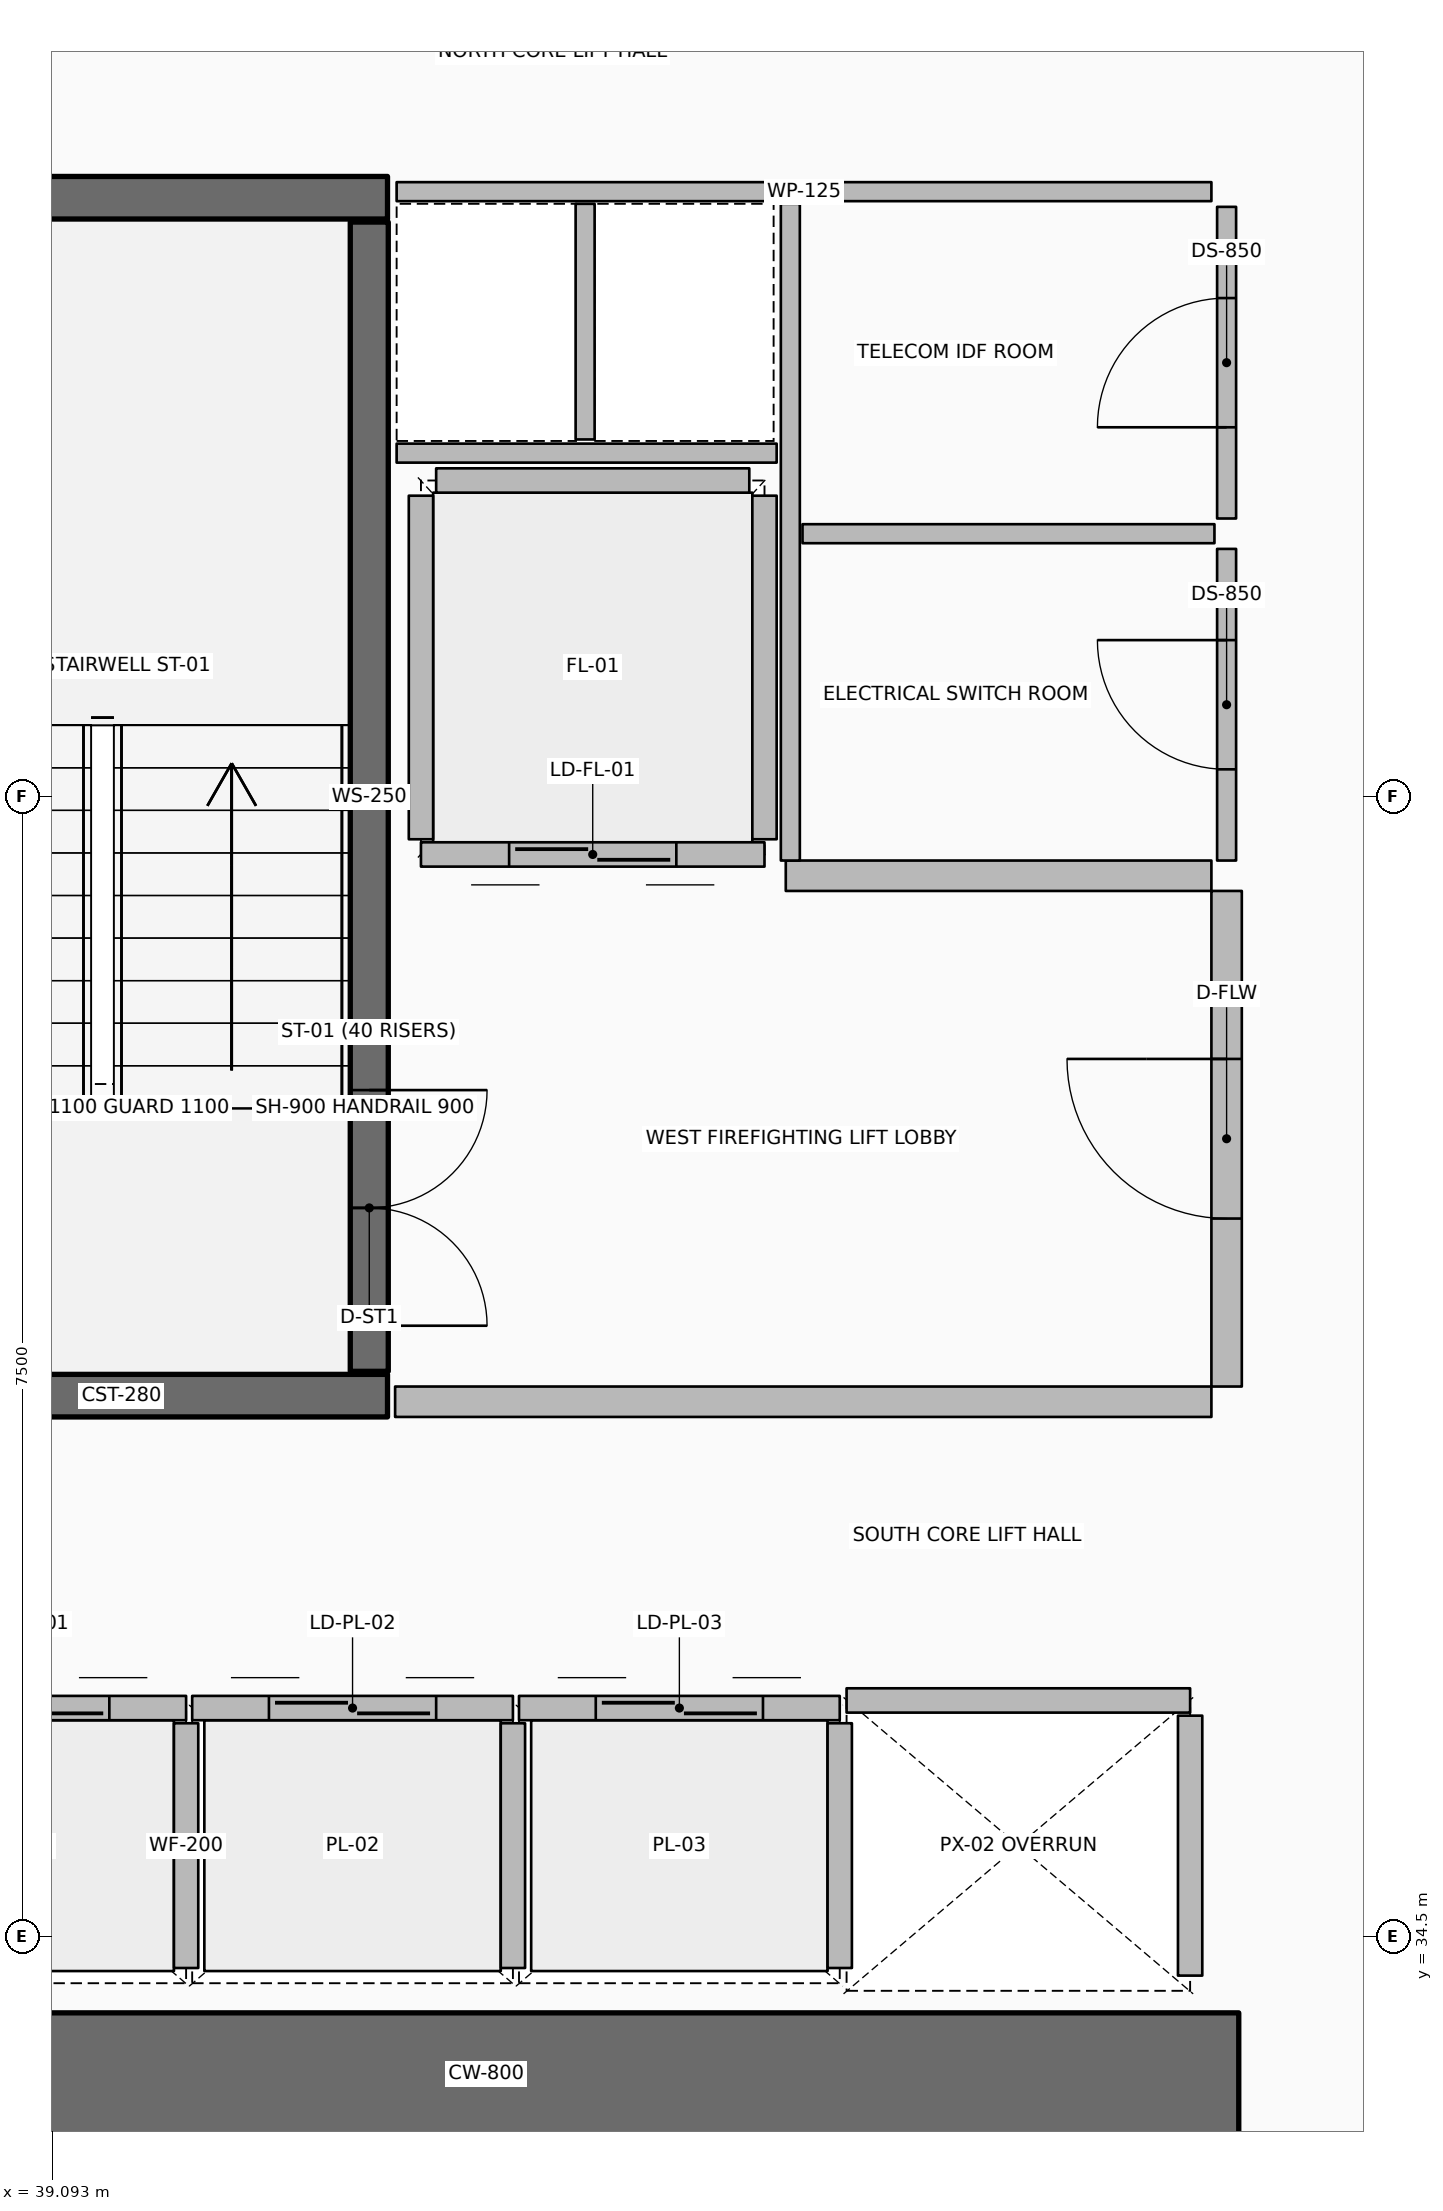
"""IFC4 building model, lengths in metres.
Left out: names, types, materials, properties, quantities, classifications, styles, units other than length and angle.
Written with IfcOpenShell. Run it as: python <this file> out.ifc"""

import sys

from ifc_helpers import new_model, si_unit, direction, frame, frame_2d, origin, origin_2d, place, context, subcontext, project, spatial, rectangle, hollow_rectangle, extrude, element, fill, save


model = new_model("IFC4")
c1 = context("Model", 3, precision=1e-05, world=origin(), true_north=direction((0.0, 1.0)))
c2 = subcontext(c1, "Body", "Model", "MODEL_VIEW")
j1 = project(units=[si_unit("LENGTHUNIT", "METRE"), si_unit("PLANEANGLEUNIT", "RADIAN")], contexts=[c1])
p1 = place(None, origin())
s1 = spatial("IfcSite", under=j1, at=p1, CompositionType="ELEMENT")
p2 = place(p1, origin())
s2 = spatial("IfcBuilding", under=s1, at=p2, CompositionType="ELEMENT")
p3 = place(p2, frame((0.0, 0.0, 116.4)))
s3 = spatial("IfcBuildingStorey", under=s2, at=p3, CompositionType="ELEMENT", Elevation=116.4)
p4 = place(p3, frame((37.0, 33.6, 0.0), z_axis=(0.0, 0.0, 1.0), x_axis=(1.0, 0.0, 0.0)))
e1 = element("IfcWall", 1, at=p4, inside=s3, PredefinedType="SHEAR", context=c2, shape_type="SweptSolid", body=[
    extrude(rectangle(XDim=9.9, YDim=0.8, at=frame_2d((4.95, 0.0))), origin(), (0.0, 0.0, 1.0), 6.6),
])
for number, where, z_axis, x_axis in (
    (2, (37.8, 38.06, 0.0), (0.0, 0.0, 1.0), (1.0, 0.0, 0.0)),
    (3, (37.8, 45.94, 0.0), (0.0, 0.0, 1.0), (1.0, 0.0, 0.0)),
):
    element("IfcWall", number, at=place(p3, frame(where, z_axis=z_axis, x_axis=x_axis)), inside=s3, PredefinedType="SHEAR", context=c2, shape_type="SweptSolid", body=[
        extrude(rectangle(XDim=3.5, YDim=0.28, at=frame_2d((1.75, 0.0))), origin(), (0.0, 0.0, 1.0), 6.6),
    ])
p5 = place(p3, frame((41.18, 42.47, 0.0), z_axis=(0.0, 0.0, 1.0), x_axis=(1.0, 0.0, 0.0)))
e4 = element("IfcColumn", 4, at=p5, inside=s3, PredefinedType="COLUMN", context=c2, shape_type="SweptSolid", body=[
    extrude(hollow_rectangle(XDim=0.2, YDim=0.2, WallThickness=0.01, InnerFilletRadius=0.01, OuterFilletRadius=0.02, at=origin_2d()), origin(), (0.0, 0.0, 1.0), 1.445),
])
p6 = place(p3, frame((41.18, 43.17, 0.0), z_axis=(0.0, 0.0, 1.0), x_axis=(1.0, 0.0, 0.0)))
e5 = element("IfcColumn", 5, at=p6, inside=s3, PredefinedType="COLUMN", context=c2, shape_type="SweptSolid", body=[
    extrude(hollow_rectangle(XDim=0.2, YDim=0.2, WallThickness=0.01, InnerFilletRadius=0.01, OuterFilletRadius=0.02, at=origin_2d()), origin(), (0.0, 0.0, 1.0), 4.745),
])
p7 = place(p3, frame((41.18, 38.22, 0.0), z_axis=(0.0, 0.0, 1.0), x_axis=(0.0, 1.0, 0.0)))
e6 = element("IfcWall", 6, at=p7, inside=s3, PredefinedType="SOLIDWALL", context=c2, shape_type="SweptSolid", body=[
    extrude(rectangle(XDim=7.56, YDim=0.25, at=frame_2d((3.78, 0.0))), origin(), (0.0, 0.0, 1.0), 6.28),
])
p8 = place(p7, frame((0.3, 0.0, 0.0)))
e7 = element("IfcOpeningElement", 7, at=p8, cuts=e6, PredefinedType="OPENING", context=c2, shape_type="SweptSolid", body=[
    extrude(rectangle(XDim=1.55, YDim=2.15, at=frame_2d((0.775, 1.075))), frame((0.0, 0.135, 0.0), z_axis=(0.0, -1.0, 0.0), x_axis=(1.0, 0.0, 0.0)), (0.0, 0.0, 1.0), 0.27),
])
p9 = place(p3, frame((37.865, 36.005, 0.0), z_axis=(0.0, 0.0, 1.0), x_axis=(1.0, 0.0, 0.0)))
e8 = element("IfcWall", 8, at=p9, inside=s3, PredefinedType="PARTITIONING", context=c2, shape_type="SweptSolid", body=[
    extrude(rectangle(XDim=2.11, YDim=0.16, at=frame_2d((1.055, 0.0))), origin(), (0.0, 0.0, 1.0), 6.28),
])
p10 = place(p9, frame((0.505, 0.0, 0.0)))
e9 = element("IfcOpeningElement", 9, at=p10, cuts=e8, PredefinedType="OPENING", context=c2, shape_type="SweptSolid", body=[
    extrude(rectangle(XDim=1.1, YDim=2.1, at=frame_2d((0.55, 1.05))), frame((0.0, 0.09, 0.0), z_axis=(0.0, -1.0, 0.0), x_axis=(1.0, 0.0, 0.0)), (0.0, 0.0, 1.0), 0.18),
])
p11 = place(p3, frame((39.975, 34.295, 0.0), z_axis=(0.0, 0.0, 1.0), x_axis=(0.0, 1.0, 0.0)))
e10 = element("IfcWall", 10, at=p11, inside=s3, PredefinedType="PARTITIONING", context=c2, shape_type="SweptSolid", body=[
    extrude(rectangle(XDim=1.61, YDim=0.16, at=frame_2d((0.805, 0.0))), origin(), (0.0, 0.0, 1.0), 6.28),
])
p12 = place(p3, frame((40.015, 36.005, 0.0), z_axis=(0.0, 0.0, 1.0), x_axis=(1.0, 0.0, 0.0)))
e11 = element("IfcWall", 11, at=p12, inside=s3, PredefinedType="PARTITIONING", context=c2, shape_type="SweptSolid", body=[
    extrude(rectangle(XDim=2.11, YDim=0.16, at=frame_2d((1.055, 0.0))), origin(), (0.0, 0.0, 1.0), 6.28),
])
p13 = place(p12, frame((0.505, 0.0, 0.0)))
e12 = element("IfcOpeningElement", 12, at=p13, cuts=e11, PredefinedType="OPENING", context=c2, shape_type="SweptSolid", body=[
    extrude(rectangle(XDim=1.1, YDim=2.1, at=frame_2d((0.55, 1.05))), frame((0.0, 0.09, 0.0), z_axis=(0.0, -1.0, 0.0), x_axis=(1.0, 0.0, 0.0)), (0.0, 0.0, 1.0), 0.18),
])
p14 = place(p3, frame((42.125, 34.295, 0.0), z_axis=(0.0, 0.0, 1.0), x_axis=(0.0, 1.0, 0.0)))
e13 = element("IfcWall", 13, at=p14, inside=s3, PredefinedType="PARTITIONING", context=c2, shape_type="SweptSolid", body=[
    extrude(rectangle(XDim=1.61, YDim=0.16, at=frame_2d((0.805, 0.0))), origin(), (0.0, 0.0, 1.0), 6.28),
])
p15 = place(p3, frame((42.165, 36.005, 0.0), z_axis=(0.0, 0.0, 1.0), x_axis=(1.0, 0.0, 0.0)))
e14 = element("IfcWall", 14, at=p15, inside=s3, PredefinedType="PARTITIONING", context=c2, shape_type="SweptSolid", body=[
    extrude(rectangle(XDim=2.11, YDim=0.16, at=frame_2d((1.055, 0.0))), origin(), (0.0, 0.0, 1.0), 6.28),
])
p16 = place(p15, frame((0.505, 0.0, 0.0)))
e15 = element("IfcOpeningElement", 15, at=p16, cuts=e14, PredefinedType="OPENING", context=c2, shape_type="SweptSolid", body=[
    extrude(rectangle(XDim=1.1, YDim=2.1, at=frame_2d((0.55, 1.05))), frame((0.0, 0.09, 0.0), z_axis=(0.0, -1.0, 0.0), x_axis=(1.0, 0.0, 0.0)), (0.0, 0.0, 1.0), 0.18),
])
p17 = place(p3, frame((44.275, 34.295, 0.0), z_axis=(0.0, 0.0, 1.0), x_axis=(0.0, 1.0, 0.0)))
e16 = element("IfcWall", 16, at=p17, inside=s3, PredefinedType="PARTITIONING", context=c2, shape_type="SweptSolid", body=[
    extrude(rectangle(XDim=1.61, YDim=0.16, at=frame_2d((0.805, 0.0))), origin(), (0.0, 0.0, 1.0), 6.28),
])
p18 = place(p3, frame((44.32, 36.055, 0.0), z_axis=(0.0, 0.0, 1.0), x_axis=(1.0, 0.0, 0.0)))
e17 = element("IfcWall", 17, at=p18, inside=s3, PredefinedType="PARTITIONING", context=c2, shape_type="SweptSolid", body=[
    extrude(rectangle(XDim=2.26, YDim=0.16, at=frame_2d((1.13, 0.0))), origin(), (0.0, 0.0, 1.0), 6.28),
])
p19 = place(p3, frame((46.58, 34.245, 0.0), z_axis=(0.0, 0.0, 1.0), x_axis=(0.0, 1.0, 0.0)))
e18 = element("IfcWall", 18, at=p19, inside=s3, PredefinedType="PARTITIONING", context=c2, shape_type="SweptSolid", body=[
    extrude(rectangle(XDim=1.71, YDim=0.16, at=frame_2d((0.855, 0.0))), origin(), (0.0, 0.0, 1.0), 6.28),
])
p20 = place(p3, frame((43.78, 41.62, 0.0), z_axis=(0.0, 0.0, 1.0), x_axis=(-1.0, 0.0, 0.0)))
e19 = element("IfcWall", 19, at=p20, inside=s3, PredefinedType="PARTITIONING", context=c2, shape_type="SweptSolid", body=[
    extrude(rectangle(XDim=2.26, YDim=0.16, at=frame_2d((1.13, 0.0))), origin(), (0.0, 0.0, 1.0), 6.28),
])
p21 = place(p20, frame((0.58, 0.0, 0.0)))
e20 = element("IfcOpeningElement", 20, at=p21, cuts=e19, PredefinedType="OPENING", context=c2, shape_type="SweptSolid", body=[
    extrude(rectangle(XDim=1.1, YDim=2.1, at=frame_2d((0.55, 1.05))), frame((0.0, 0.09, 0.0), z_axis=(0.0, -1.0, 0.0), x_axis=(1.0, 0.0, 0.0)), (0.0, 0.0, 1.0), 0.18),
])
for number, where, z_axis, x_axis in (
    (21, (43.78, 41.72, 0.0), (0.0, 0.0, 1.0), (0.0, 1.0, 0.0)),
    (22, (41.52, 41.72, 0.0), (0.0, 0.0, 1.0), (0.0, 1.0, 0.0)),
):
    element("IfcWall", number, at=place(p3, frame(where, z_axis=z_axis, x_axis=x_axis)), inside=s3, PredefinedType="PARTITIONING", context=c2, shape_type="SweptSolid", body=[
        extrude(rectangle(XDim=2.26, YDim=0.16, at=frame_2d((1.13, 0.0))), origin(), (0.0, 0.0, 1.0), 6.28),
    ])
p22 = place(p3, frame((41.62, 44.08, 0.0), z_axis=(0.0, 0.0, 1.0), x_axis=(1.0, 0.0, 0.0)))
e23 = element("IfcWall", 23, at=p22, inside=s3, PredefinedType="PARTITIONING", context=c2, shape_type="SweptSolid", body=[
    extrude(rectangle(XDim=2.06, YDim=0.16, at=frame_2d((1.03, 0.0))), origin(), (0.0, 0.0, 1.0), 6.28),
])
p23 = place(p3, frame((41.35, 38.02, 0.0), z_axis=(0.0, 0.0, 1.0), x_axis=(1.0, 0.0, 0.0)))
e24 = element("IfcWall", 24, at=p23, inside=s3, PredefinedType="PARTITIONING", context=c2, shape_type="SweptSolid", body=[
    extrude(rectangle(XDim=5.37, YDim=0.2, at=frame_2d((2.685, 0.0))), origin(), (0.0, 0.0, 1.0), 6.28),
])
p24 = place(p3, frame((43.92, 41.48, 0.0), z_axis=(0.0, 0.0, 1.0), x_axis=(1.0, 0.0, 0.0)))
e25 = element("IfcWall", 25, at=p24, inside=s3, PredefinedType="PARTITIONING", context=c2, shape_type="SweptSolid", body=[
    extrude(rectangle(XDim=2.8, YDim=0.2, at=frame_2d((1.4, 0.0))), origin(), (0.0, 0.0, 1.0), 6.28),
])
p25 = place(p3, frame((46.82, 38.12, 0.0), z_axis=(0.0, 0.0, 1.0), x_axis=(0.0, 1.0, 0.0)))
e26 = element("IfcWall", 26, at=p25, inside=s3, PredefinedType="PARTITIONING", context=c2, shape_type="SweptSolid", body=[
    extrude(rectangle(XDim=3.26, YDim=0.2, at=frame_2d((1.63, 0.0))), origin(), (0.0, 0.0, 1.0), 6.28),
])
p26 = place(p25, frame((1.105, 0.0, 0.0)))
e27 = element("IfcOpeningElement", 27, at=p26, cuts=e26, PredefinedType="OPENING", context=c2, shape_type="SweptSolid", body=[
    extrude(rectangle(XDim=1.05, YDim=2.1, at=frame_2d((0.525, 1.05))), frame((0.0, 0.11, 0.0), z_axis=(0.0, -1.0, 0.0), x_axis=(1.0, 0.0, 0.0)), (0.0, 0.0, 1.0), 0.22),
])
p27 = place(p3, frame((41.36, 45.98, 0.0), z_axis=(0.0, 0.0, 1.0), x_axis=(1.0, 0.0, 0.0)))
e28 = element("IfcWall", 28, at=p27, inside=s3, PredefinedType="PARTITIONING", context=c2, shape_type="SweptSolid", body=[
    extrude(rectangle(XDim=5.36, YDim=0.125, at=frame_2d((2.68, 0.0))), origin(), (0.0, 0.0, 1.0), 5.72),
])
p28 = place(p3, frame((41.36, 44.26, 0.0), z_axis=(0.0, 0.0, 1.0), x_axis=(1.0, 0.0, 0.0)))
e29 = element("IfcWall", 29, at=p28, inside=s3, PredefinedType="PARTITIONING", context=c2, shape_type="SweptSolid", body=[
    extrude(rectangle(XDim=2.5, YDim=0.125, at=frame_2d((1.25, 0.0))), origin(), (0.0, 0.0, 1.0), 5.72),
])
p29 = place(p3, frame((42.6, 44.35, 0.0), z_axis=(0.0, 0.0, 1.0), x_axis=(0.0, 1.0, 0.0)))
e30 = element("IfcWall", 30, at=p29, inside=s3, PredefinedType="PARTITIONING", context=c2, shape_type="SweptSolid", body=[
    extrude(rectangle(XDim=1.55, YDim=0.125, at=frame_2d((0.775, 0.0))), origin(), (0.0, 0.0, 1.0), 5.72),
])
p30 = place(p3, frame((43.95, 41.58, 0.0), z_axis=(0.0, 0.0, 1.0), x_axis=(0.0, 1.0, 0.0)))
e31 = element("IfcWall", 31, at=p30, inside=s3, PredefinedType="PARTITIONING", context=c2, shape_type="SweptSolid", body=[
    extrude(rectangle(XDim=4.32, YDim=0.125, at=frame_2d((2.16, 0.0))), origin(), (0.0, 0.0, 1.0), 5.72),
])
p31 = place(p3, frame((44.03, 43.73, 0.0), z_axis=(0.0, 0.0, 1.0), x_axis=(1.0, 0.0, 0.0)))
e32 = element("IfcWall", 32, at=p31, inside=s3, PredefinedType="PARTITIONING", context=c2, shape_type="SweptSolid", body=[
    extrude(rectangle(XDim=2.71, YDim=0.125, at=frame_2d((1.355, 0.0))), origin(), (0.0, 0.0, 1.0), 5.72),
])
p32 = place(p3, frame((46.82, 41.58, 0.0), z_axis=(0.0, 0.0, 1.0), x_axis=(0.0, 1.0, 0.0)))
e33 = element("IfcWall", 33, at=p32, inside=s3, PredefinedType="PARTITIONING", context=c2, shape_type="SweptSolid", body=[
    extrude(rectangle(XDim=2.05, YDim=0.125, at=frame_2d((1.025, 0.0))), origin(), (0.0, 0.0, 1.0), 5.72),
])
p33 = place(p32, frame((0.6, 0.0, 0.0)))
e34 = element("IfcOpeningElement", 34, at=p33, cuts=e33, PredefinedType="OPENING", context=c2, shape_type="SweptSolid", body=[
    extrude(rectangle(XDim=0.85, YDim=2.06, at=frame_2d((0.425, 1.03))), frame((0.0, 0.073, 0.0), z_axis=(0.0, -1.0, 0.0), x_axis=(1.0, 0.0, 0.0)), (0.0, 0.0, 1.0), 0.145),
])
p34 = place(p3, frame((46.82, 43.83, 0.0), z_axis=(0.0, 0.0, 1.0), x_axis=(0.0, 1.0, 0.0)))
e35 = element("IfcWall", 35, at=p34, inside=s3, PredefinedType="PARTITIONING", context=c2, shape_type="SweptSolid", body=[
    extrude(rectangle(XDim=2.05, YDim=0.125, at=frame_2d((1.025, 0.0))), origin(), (0.0, 0.0, 1.0), 5.72),
])
p35 = place(p34, frame((0.6, 0.0, 0.0)))
e36 = element("IfcOpeningElement", 36, at=p35, cuts=e35, PredefinedType="OPENING", context=c2, shape_type="SweptSolid", body=[
    extrude(rectangle(XDim=0.85, YDim=2.06, at=frame_2d((0.425, 1.03))), frame((0.0, 0.073, 0.0), z_axis=(0.0, -1.0, 0.0), x_axis=(1.0, 0.0, 0.0)), (0.0, 0.0, 1.0), 0.145),
])
p36 = place(p8, origin())
e37 = element("IfcDoor", 37, at=p36, inside=s3, OperationType="DOUBLE_DOOR_SINGLE_SWING", PredefinedType="DOOR", context=c2, shape_type="SweptSolid", body=[
    extrude(rectangle(XDim=1.55, YDim=2.15, at=frame_2d((0.775, 1.075))), frame((0.0, 0.025, 0.0), z_axis=(0.0, -1.0, 0.0), x_axis=(1.0, 0.0, 0.0)), (0.0, 0.0, 1.0), 0.05),
])
fill(e7, e37)
p37 = place(p10, origin())
e38 = element("IfcDoor", 38, at=p37, inside=s3, OperationType="DOUBLE_DOOR_SLIDING", PredefinedType="DOOR", context=c2, shape_type="SweptSolid", body=[
    extrude(rectangle(XDim=1.1, YDim=2.1, at=frame_2d((0.55, 1.05))), frame((0.0, 0.025, 0.0), z_axis=(0.0, -1.0, 0.0), x_axis=(1.0, 0.0, 0.0)), (0.0, 0.0, 1.0), 0.05),
])
fill(e9, e38)
p38 = place(p13, origin())
e39 = element("IfcDoor", 39, at=p38, inside=s3, OperationType="DOUBLE_DOOR_SLIDING", PredefinedType="DOOR", context=c2, shape_type="SweptSolid", body=[
    extrude(rectangle(XDim=1.1, YDim=2.1, at=frame_2d((0.55, 1.05))), frame((0.0, 0.025, 0.0), z_axis=(0.0, -1.0, 0.0), x_axis=(1.0, 0.0, 0.0)), (0.0, 0.0, 1.0), 0.05),
])
fill(e12, e39)
p39 = place(p16, origin())
e40 = element("IfcDoor", 40, at=p39, inside=s3, OperationType="DOUBLE_DOOR_SLIDING", PredefinedType="DOOR", context=c2, shape_type="SweptSolid", body=[
    extrude(rectangle(XDim=1.1, YDim=2.1, at=frame_2d((0.55, 1.05))), frame((0.0, 0.025, 0.0), z_axis=(0.0, -1.0, 0.0), x_axis=(1.0, 0.0, 0.0)), (0.0, 0.0, 1.0), 0.05),
])
fill(e15, e40)
p40 = place(p21, origin())
e41 = element("IfcDoor", 41, at=p40, inside=s3, OperationType="DOUBLE_DOOR_SLIDING", PredefinedType="DOOR", context=c2, shape_type="SweptSolid", body=[
    extrude(rectangle(XDim=1.1, YDim=2.1, at=frame_2d((0.55, 1.05))), frame((0.0, 0.025, 0.0), z_axis=(0.0, -1.0, 0.0), x_axis=(1.0, 0.0, 0.0)), (0.0, 0.0, 1.0), 0.05),
])
fill(e20, e41)
p41 = place(p26, origin())
e42 = element("IfcDoor", 42, at=p41, inside=s3, OperationType="SINGLE_SWING_RIGHT", PredefinedType="DOOR", context=c2, shape_type="SweptSolid", body=[
    extrude(rectangle(XDim=1.05, YDim=2.1, at=frame_2d((0.525, 1.05))), frame((0.0, 0.025, 0.0), z_axis=(0.0, -1.0, 0.0), x_axis=(1.0, 0.0, 0.0)), (0.0, 0.0, 1.0), 0.05),
])
fill(e27, e42)
p42 = place(p33, origin())
e43 = element("IfcDoor", 43, at=p42, inside=s3, OperationType="SINGLE_SWING_RIGHT", PredefinedType="DOOR", context=c2, shape_type="SweptSolid", body=[
    extrude(rectangle(XDim=0.85, YDim=2.06, at=frame_2d((0.425, 1.03))), frame((0.0, 0.025, 0.0), z_axis=(0.0, -1.0, 0.0), x_axis=(1.0, 0.0, 0.0)), (0.0, 0.0, 1.0), 0.05),
])
fill(e34, e43)
p43 = place(p35, origin())
e44 = element("IfcDoor", 44, at=p43, inside=s3, OperationType="SINGLE_SWING_LEFT", PredefinedType="DOOR", context=c2, shape_type="SweptSolid", body=[
    extrude(rectangle(XDim=0.85, YDim=2.06, at=frame_2d((0.425, 1.03))), frame((0.0, 0.025, 0.0), z_axis=(0.0, -1.0, 0.0), x_axis=(1.0, 0.0, 0.0)), (0.0, 0.0, 1.0), 0.05),
])
fill(e36, e44)
save(model, sys.argv[1])
